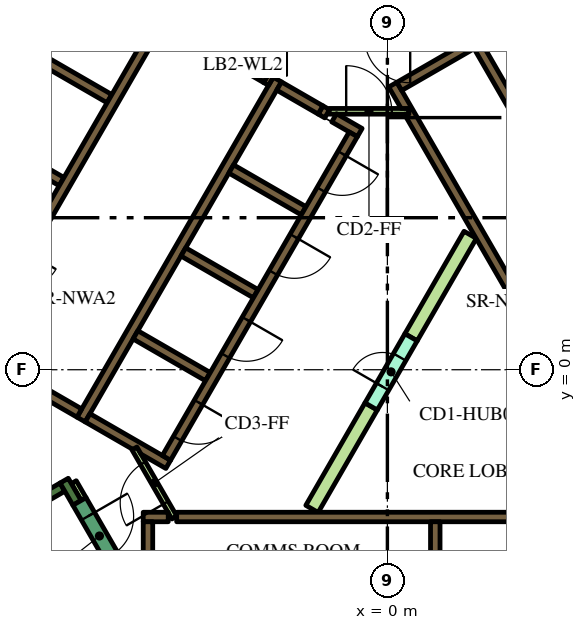
"""IFC4 building model, lengths in metres.
Left out: names, types, materials, properties, quantities, classifications, styles, units other than length and angle.
Written with IfcOpenShell. Run it as: python <this file> out.ifc"""

import sys

from ifc_helpers import new_model, si_unit, direction, frame, frame_2d, origin, place, context, subcontext, project, spatial, polyline, rectangle, outline, extrude, element, fill, save


model = new_model("IFC4")
c1 = context("Model", 3, precision=1e-05, world=origin(), true_north=direction((0.0, 1.0)))
c2 = subcontext(c1, "Body", "Model", "MODEL_VIEW")
j1 = project(units=[si_unit("LENGTHUNIT", "METRE"), si_unit("PLANEANGLEUNIT", "RADIAN")], contexts=[c1])
p1 = place(None, origin())
s1 = spatial("IfcSite", under=j1, at=p1, CompositionType="ELEMENT")
p2 = place(p1, origin())
s2 = spatial("IfcBuilding", under=s1, at=p2, CompositionType="ELEMENT")
p3 = place(p2, frame((0.0, 0.0, 107.1)))
s3 = spatial("IfcBuildingStorey", under=s2, at=p3, CompositionType="ELEMENT", Elevation=107.1)
p4 = place(p3, frame((-15.36, -1.503, 0.0), z_axis=(0.0, 0.0, 1.0), x_axis=(0.50000389221, 0.866023156604, 0.0)))
e1 = element("IfcWall", 1, at=p4, inside=s3, PredefinedType="SOLIDWALL", context=c2, shape_type="SweptSolid", body=[
    extrude(rectangle(XDim=21.0, YDim=0.9, at=frame_2d((10.5, 0.0))), origin(), (0.0, 0.0, 1.0), 3.9),
])
p5 = place(p3, frame((-14.44, -6.49, 0.0), z_axis=(0.0, 0.0, 1.0), x_axis=(0.866022966069, 0.500004222222, 0.0)))
e2 = element("IfcWall", 2, at=p5, inside=s3, PredefinedType="SOLIDWALL", context=c2, shape_type="SweptSolid", body=[
    extrude(rectangle(XDim=6.8, YDim=0.25, at=frame_2d((3.4, 0.0))), origin(), (0.0, 0.0, 1.0), 3.9),
])
p6 = place(p3, frame((-8.168, -3.503, 0.0), z_axis=(0.0, 0.0, 1.0), x_axis=(-0.499952099219, 0.866053057547, 0.0)))
e3 = element("IfcWall", 3, at=p6, inside=s3, PredefinedType="SOLIDWALL", context=c2, shape_type="SweptSolid", body=[
    extrude(rectangle(XDim=0.675, YDim=0.25, at=frame_2d((0.337, 0.0))), origin(), (0.0, 0.0, 1.0), 3.9),
])
p7 = place(p3, frame((-5.545, -3.875, 0.0), z_axis=(0.0, 0.0, 1.0), x_axis=(1.0, 0.0, 0.0)))
e4 = element("IfcWall", 4, at=p7, inside=s3, PredefinedType="SOLIDWALL", context=c2, shape_type="SweptSolid", body=[
    extrude(rectangle(XDim=11.97, YDim=0.25, at=frame_2d((5.985, 0.0))), origin(), (0.0, 0.0, 1.0), 3.9),
])
p8 = place(p3, frame((-6.425, -3.875, 0.0), z_axis=(0.0, 0.0, 1.0), x_axis=(1.0, 0.0, 0.0)))
e5 = element("IfcWall", 5, at=p8, inside=s3, PredefinedType="SOLIDWALL", context=c2, shape_type="SweptSolid", body=[
    extrude(rectangle(XDim=0.658, YDim=0.25, at=frame_2d((0.329, 0.0))), origin(), (0.0, 0.0, 1.0), 3.9),
])
p9 = place(p3, frame((1.26, -4.0, 0.0), z_axis=(0.0, 0.0, 1.0), x_axis=(0.0, -1.0, 0.0)))
e6 = element("IfcWall", 6, at=p9, inside=s3, PredefinedType="SOLIDWALL", context=c2, shape_type="SweptSolid", body=[
    extrude(rectangle(XDim=2.2, YDim=0.25, at=frame_2d((1.1, 0.0))), origin(), (0.0, 0.0, 1.0), 3.9),
])
p10 = place(p3, frame((-6.3, -4.0, 0.0), z_axis=(0.0, 0.0, 1.0), x_axis=(0.0, -1.0, 0.0)))
e7 = element("IfcWall", 7, at=p10, inside=s3, PredefinedType="SOLIDWALL", context=c2, shape_type="SweptSolid", body=[
    extrude(rectangle(XDim=3.154, YDim=0.25, at=frame_2d((1.577, 0.0))), origin(), (0.0, 0.0, 1.0), 3.9),
])
p11 = place(p3, origin())
e8 = element("IfcWall", 8, at=p11, inside=s3, PredefinedType="SOLIDWALL", context=c2, shape_type="SweptSolid", body=[
    extrude(outline(polyline([(0.566, 6.725), (0.566, 6.875), (0.566, 6.875), (0.565, 6.875), (0.361, 6.875), (0.035, 7.439), (0.252, 7.564), (0.377, 7.348), (6.552, -3.348), (6.677, -3.564), (6.46, -3.689), (0.448, 6.725), (0.565, 6.725), (0.566, 6.725), (0.566, 6.725)])), origin(), (0.0, 0.0, 1.0), 3.9),
])
p12 = place(p3, frame((0.314, 7.456, 0.0), z_axis=(0.0, 0.0, 1.0), x_axis=(0.866013897511, 0.50001992892, 0.0)))
e9 = element("IfcWall", 9, at=p12, inside=s3, PredefinedType="SOLIDWALL", context=c2, shape_type="SweptSolid", body=[
    extrude(rectangle(XDim=3.268, YDim=0.25, at=frame_2d((1.634, 0.0))), origin(), (0.0, 0.0, 1.0), 3.9),
])
p13 = place(p3, frame((-8.06, -1.311, 0.0), z_axis=(0.0, 0.0, 1.0), x_axis=(0.50000273126, 0.866023826885, 0.0)))
e10 = element("IfcWall", 10, at=p13, inside=s3, PredefinedType="SOLIDWALL", context=c2, shape_type="SweptSolid", body=[
    extrude(rectangle(XDim=10.33, YDim=0.25, at=frame_2d((5.165, 0.0))), origin(), (0.0, 0.0, 1.0), 3.9),
])
p14 = place(p3, frame((-1.758, 6.835, 0.0), z_axis=(0.0, 0.0, 1.0), x_axis=(0.865982457891, -0.500074377092, 0.0)))
e11 = element("IfcWall", 11, at=p14, inside=s3, PredefinedType="SOLIDWALL", context=c2, shape_type="SweptSolid", body=[
    extrude(rectangle(XDim=0.2, YDim=0.25, at=frame_2d((0.1, 0.0))), origin(), (0.0, 0.0, 1.0), 3.9),
])
p15 = place(p3, frame((-1.76, 6.836, 0.0), z_axis=(0.0, 0.0, 1.0), x_axis=(-0.865952863304, 0.500125622755, 0.0)))
e12 = element("IfcWall", 12, at=p15, inside=s3, PredefinedType="SOLIDWALL", context=c2, shape_type="SweptSolid", body=[
    extrude(rectangle(XDim=1.258, YDim=0.25, at=frame_2d((0.629, 0.0))), origin(), (0.0, 0.0, 1.0), 3.9),
])
p16 = place(p3, frame((-0.728, 6.24, 0.0), z_axis=(0.0, 0.0, 1.0), x_axis=(-0.865955664968, 0.500120771724, 0.0)))
e13 = element("IfcWall", 13, at=p16, inside=s3, PredefinedType="SOLIDWALL", context=c2, shape_type="SweptSolid", body=[
    extrude(rectangle(XDim=0.778, YDim=0.25, at=frame_2d((0.389, 0.0))), origin(), (0.0, 0.0, 1.0), 3.9),
])
for number, where, z_axis, x_axis in (
    (14, (-2.204, 4.182, 0.0), (0.0, 0.0, 1.0), (-0.866, 0.5, 0.0)),
    (15, (-5.369, 3.1, 0.0), (0.0, 0.0, 1.0), (0.866, -0.5, 0.0)),
    (16, (-4.724, -0.182, 0.0), (0.0, 0.0, 1.0), (-0.866, 0.5, 0.0)),
):
    element("IfcWall", number, at=place(p3, frame(where, z_axis=z_axis, x_axis=x_axis)), inside=s3, PredefinedType="SOLIDWALL", context=c2, shape_type="SweptSolid", body=[
        extrude(rectangle(XDim=2.2, YDim=0.25, at=frame_2d((1.1, 0.0))), origin(), (0.0, 0.0, 1.0), 3.9),
    ])
e17 = element("IfcWall", 17, at=p11, inside=s3, PredefinedType="SOLIDWALL", context=c2, shape_type="SweptSolid", body=[
    extrude(outline(polyline([(-5.922, -2.257), (-5.922, -2.257), (-5.705, -2.382), (-5.83, -2.598), (-6.483, -2.221), (-6.591, -2.033), (-6.591, -2.033), (-6.7, -2.096), (-7.952, -1.373), (-7.827, -1.156), (-5.922, -2.257)])), origin(), (0.0, 0.0, 1.0), 3.9),
])
p17 = place(p3, frame((-8.106, -1.14, 0.0), z_axis=(0.0, 0.0, 1.0), x_axis=(-0.866000643155, 0.500042884217, 0.0)))
e18 = element("IfcWall", 18, at=p17, inside=s3, PredefinedType="SOLIDWALL", context=c2, shape_type="SweptSolid", body=[
    extrude(rectangle(XDim=5.65, YDim=0.25, at=frame_2d((2.825, 0.0))), origin(), (0.0, 0.0, 1.0), 3.9),
])
e19 = element("IfcWall", 19, at=p11, inside=s3, PredefinedType="SOLIDWALL", context=c2, shape_type="SweptSolid", body=[
    extrude(outline(polyline([(-3.128, 7.481), (-3.259, 7.557), (-3.134, 7.773), (-3.003, 7.698), (-3.128, 7.481)])), origin(), (0.0, 0.0, 1.0), 3.9),
])
for number, where, z_axis, x_axis in (
    (20, (-8.574, 4.95, 0.0), (0.0, 0.0, 1.0), (-0.866, 0.5, 0.0)),
    (21, (-7.314, 7.132, 0.0), (0.0, 0.0, 1.0), (-0.866, 0.5, 0.0)),
):
    element("IfcWall", number, at=place(p3, frame(where, z_axis=z_axis, x_axis=x_axis)), inside=s3, PredefinedType="SOLIDWALL", context=c2, shape_type="SweptSolid", body=[
        extrude(rectangle(XDim=2.2, YDim=0.25, at=frame_2d((1.1, 0.0))), origin(), (0.0, 0.0, 1.0), 3.9),
    ])
p18 = place(p3, frame((-7.959, 10.415, 0.0), z_axis=(0.0, 0.0, 1.0), x_axis=(0.866020958405, -0.500007699544, 0.0)))
e22 = element("IfcWall", 22, at=p18, inside=s3, PredefinedType="SOLIDWALL", context=c2, shape_type="SweptSolid", body=[
    extrude(rectangle(XDim=4.1, YDim=0.25, at=frame_2d((2.05, 0.0))), origin(), (0.0, 0.0, 1.0), 3.9),
])
p19 = place(p3, frame((-8.252, -2.958, 0.0), z_axis=(0.0, 0.0, 1.0), x_axis=(0.500174715838, -0.865924508047, 0.0)))
e23 = element("IfcWall", 23, at=p19, inside=s3, PredefinedType="PARTITIONING", context=c2, shape_type="SweptSolid", body=[
    extrude(rectangle(XDim=0.514, YDim=0.15, at=frame_2d((0.257, 0.0))), origin(), (0.0, 0.0, 1.0), 2.75),
])
e24 = element("IfcWall", 24, at=p11, inside=s3, PredefinedType="PARTITIONING", context=c2, shape_type="SweptSolid", body=[
    extrude(outline(polyline([(-0.59, -0.872), (-0.265, -1.059), (-1.822, -3.756), (-2.147, -3.568), (-0.59, -0.872)])), origin(), (0.0, 0.0, 1.0), 2.75),
])
e25 = element("IfcWall", 25, at=p11, inside=s3, PredefinedType="PARTITIONING", context=c2, shape_type="SweptSolid", body=[
    extrude(outline(polyline([(2.017, 3.643), (2.342, 3.456), (0.785, 0.76), (0.46, 0.947), (2.017, 3.643)])), origin(), (0.0, 0.0, 1.0), 2.75),
])
p20 = place(p3, frame((8.565, -2.185, 0.0), z_axis=(0.0, 0.0, 1.0), x_axis=(-0.499997954832, 0.866026584559, 0.0)))
e26 = element("IfcWall", 26, at=p20, inside=s3, PredefinedType="SOLIDWALL", context=c2, shape_type="SweptSolid", body=[
    extrude(rectangle(XDim=12.35, YDim=0.25, at=frame_2d((6.175, 0.0))), origin(), (0.0, 0.0, 1.0), 3.9),
])
p21 = place(p20, frame((5.725, 0.0, 0.0)))
e27 = element("IfcOpeningElement", 27, at=p21, cuts=e26, PredefinedType="OPENING", context=c2, shape_type="SweptSolid", body=[
    extrude(rectangle(XDim=0.9, YDim=2.1, at=frame_2d((0.45, 1.05))), frame((0.0, 0.135, 0.0), z_axis=(0.0, -1.0, 0.0), x_axis=(1.0, 0.0, 0.0)), (0.0, 0.0, 1.0), 0.27),
])
p22 = place(p3, frame((-6.008, 9.144, 0.0), z_axis=(0.0, 0.0, 1.0), x_axis=(-0.500006956611, -0.866021387346, 0.0)))
e28 = element("IfcWall", 28, at=p22, inside=s3, PredefinedType="SOLIDWALL", context=c2, shape_type="SweptSolid", body=[
    extrude(rectangle(XDim=9.83, YDim=0.25, at=frame_2d((4.915, 0.0))), origin(), (0.0, 0.0, 1.0), 3.9),
])
p23 = place(p22, frame((6.985, 0.0, 0.0)))
e29 = element("IfcOpeningElement", 29, at=p23, cuts=e28, PredefinedType="OPENING", context=c2, shape_type="SweptSolid", body=[
    extrude(rectangle(XDim=0.9, YDim=2.1, at=frame_2d((0.45, 1.05))), frame((0.0, 0.135, 0.0), z_axis=(0.0, -1.0, 0.0), x_axis=(1.0, 0.0, 0.0)), (0.0, 0.0, 1.0), 0.27),
])
p24 = place(p3, frame((-0.898, 6.194, 0.0), z_axis=(0.0, 0.0, 1.0), x_axis=(-0.499996202215, -0.866027596426, 0.0)))
e30 = element("IfcWall", 30, at=p24, inside=s3, PredefinedType="SOLIDWALL", context=c2, shape_type="SweptSolid", body=[
    extrude(rectangle(XDim=9.83, YDim=0.25, at=frame_2d((4.915, 0.0))), origin(), (0.0, 0.0, 1.0), 3.9),
])
p25 = place(p24, frame((0.585, 0.0, 0.0)))
e31 = element("IfcOpeningElement", 31, at=p25, cuts=e30, PredefinedType="OPENING", context=c2, shape_type="SweptSolid", body=[
    extrude(rectangle(XDim=1.1, YDim=2.1, at=frame_2d((0.55, 1.05))), frame((0.0, 0.135, 0.0), z_axis=(0.0, -1.0, 0.0), x_axis=(1.0, 0.0, 0.0)), (0.0, 0.0, 1.0), 0.27),
])
p26 = place(p24, frame((3.105, 0.0, 0.0)))
e32 = element("IfcOpeningElement", 32, at=p26, cuts=e30, PredefinedType="OPENING", context=c2, shape_type="SweptSolid", body=[
    extrude(rectangle(XDim=1.1, YDim=2.1, at=frame_2d((0.55, 1.05))), frame((0.0, 0.135, 0.0), z_axis=(0.0, -1.0, 0.0), x_axis=(1.0, 0.0, 0.0)), (0.0, 0.0, 1.0), 0.27),
])
p27 = place(p24, frame((5.625, 0.0, 0.0)))
e33 = element("IfcOpeningElement", 33, at=p27, cuts=e30, PredefinedType="OPENING", context=c2, shape_type="SweptSolid", body=[
    extrude(rectangle(XDim=1.1, YDim=2.1, at=frame_2d((0.55, 1.05))), frame((0.0, 0.135, 0.0), z_axis=(0.0, -1.0, 0.0), x_axis=(1.0, 0.0, 0.0)), (0.0, 0.0, 1.0), 0.27),
])
p28 = place(p24, frame((8.145, 0.0, 0.0)))
e34 = element("IfcOpeningElement", 34, at=p28, cuts=e30, PredefinedType="OPENING", context=c2, shape_type="SweptSolid", body=[
    extrude(rectangle(XDim=1.1, YDim=2.1, at=frame_2d((0.55, 1.05))), frame((0.0, 0.135, 0.0), z_axis=(0.0, -1.0, 0.0), x_axis=(1.0, 0.0, 0.0)), (0.0, 0.0, 1.0), 0.27),
])
p29 = place(p3, frame((-8.103, -3.466, 0.0), z_axis=(0.0, 0.0, 1.0), x_axis=(0.500078061341, -0.865980330357, 0.0)))
e35 = element("IfcWall", 35, at=p29, inside=s3, PredefinedType="SOLIDWALL", context=c2, shape_type="SweptSolid", body=[
    extrude(rectangle(XDim=2.1, YDim=0.4, at=frame_2d((1.05, 0.0))), origin(), (0.0, 0.0, 1.0), 3.9),
])
p30 = place(p29, frame((0.45, 0.0, 0.0)))
e36 = element("IfcOpeningElement", 36, at=p30, cuts=e35, PredefinedType="OPENING", context=c2, shape_type="SweptSolid", body=[
    extrude(rectangle(XDim=1.2, YDim=2.1, at=frame_2d((0.6, 1.05))), frame((0.0, 0.21, 0.0), z_axis=(0.0, -1.0, 0.0), x_axis=(1.0, 0.0, 0.0)), (0.0, 0.0, 1.0), 0.42),
])
p31 = place(p3, frame((-0.427, -0.966, 0.0), z_axis=(0.0, 0.0, 1.0), x_axis=(0.49994051562, 0.866059744384, 0.0)))
e37 = element("IfcWall", 37, at=p31, inside=s3, PredefinedType="PARTITIONING", context=c2, shape_type="SweptSolid", body=[
    extrude(rectangle(XDim=2.1, YDim=0.375, at=frame_2d((1.05, 0.0))), origin(), (0.0, 0.0, 1.0), 2.75),
])
p32 = place(p31, frame((0.6, 0.0, 0.0)))
e38 = element("IfcOpeningElement", 38, at=p32, cuts=e37, PredefinedType="OPENING", context=c2, shape_type="SweptSolid", body=[
    extrude(rectangle(XDim=0.9, YDim=2.1, at=frame_2d((0.45, 1.05))), frame((0.0, 0.198, 0.0), z_axis=(0.0, -1.0, 0.0), x_axis=(1.0, 0.0, 0.0)), (0.0, 0.0, 1.0), 0.395),
])
p33 = place(p3, frame((-1.534, 6.8, 0.0), z_axis=(0.0, 0.0, 1.0), x_axis=(1.0, 0.0, 0.0)))
e39 = element("IfcWall", 39, at=p33, inside=s3, PredefinedType="PARTITIONING", context=c2, shape_type="SweptSolid", body=[
    extrude(rectangle(XDim=2.1, YDim=0.15, at=frame_2d((1.05, 0.0))), origin(), (0.0, 0.0, 1.0), 2.75),
])
p34 = place(p33, frame((0.45, 0.0, 0.0)))
e40 = element("IfcOpeningElement", 40, at=p34, cuts=e39, PredefinedType="OPENING", context=c2, shape_type="SweptSolid", body=[
    extrude(rectangle(XDim=1.2, YDim=2.1, at=frame_2d((0.6, 1.05))), frame((0.0, 0.085, 0.0), z_axis=(0.0, -1.0, 0.0), x_axis=(1.0, 0.0, 0.0)), (0.0, 0.0, 1.0), 0.17),
])
p35 = place(p3, frame((-5.606, -3.89, 0.0), z_axis=(0.0, 0.0, 1.0), x_axis=(-0.500027713859, 0.866009402589, 0.0)))
e41 = element("IfcWall", 41, at=p35, inside=s3, PredefinedType="PARTITIONING", context=c2, shape_type="SweptSolid", body=[
    extrude(rectangle(XDim=2.1, YDim=0.15, at=frame_2d((1.05, 0.0))), origin(), (0.0, 0.0, 1.0), 2.75),
])
p36 = place(p35, frame((0.45, 0.0, 0.0)))
e42 = element("IfcOpeningElement", 42, at=p36, cuts=e41, PredefinedType="OPENING", context=c2, shape_type="SweptSolid", body=[
    extrude(rectangle(XDim=1.2, YDim=2.1, at=frame_2d((0.6, 1.05))), frame((0.0, 0.085, 0.0), z_axis=(0.0, -1.0, 0.0), x_axis=(1.0, 0.0, 0.0)), (0.0, 0.0, 1.0), 0.17),
])
p37 = place(p3, frame((-4.409, 8.365, 0.0), z_axis=(0.0, 0.0, 1.0), x_axis=(0.866034573852, -0.49998411664, 0.0)))
e43 = element("IfcWall", 43, at=p37, inside=s3, PredefinedType="SOLIDWALL", context=c2, shape_type="SweptSolid", body=[
    extrude(rectangle(XDim=1.4, YDim=0.25, at=frame_2d((0.7, 0.0))), origin(), (0.0, 0.0, 1.0), 3.9),
])
p38 = place(p37, frame((0.1, 0.0, 0.0)))
e44 = element("IfcOpeningElement", 44, at=p38, cuts=e43, PredefinedType="OPENING", context=c2, shape_type="SweptSolid", body=[
    extrude(rectangle(XDim=1.2, YDim=2.1, at=frame_2d((0.6, 1.05))), frame((0.0, 0.135, 0.0), z_axis=(0.0, -1.0, 0.0), x_axis=(1.0, 0.0, 0.0)), (0.0, 0.0, 1.0), 0.27),
])
p39 = place(p3, frame((-19.081, -3.9, 0.0), z_axis=(0.0, 0.0, 1.0), x_axis=(0.499998313975, 0.866026377209, 0.0)))
e45 = element("IfcWall", 45, at=p39, inside=s3, PredefinedType="PARTITIONING", context=c2, shape_type="SweptSolid", body=[
    extrude(rectangle(XDim=25.766, YDim=0.15, at=frame_2d((12.883, 0.0))), origin(), (0.0, 0.0, 1.0), 2.75),
])
p40 = place(p39, frame((19.306, 0.0, 0.0)))
e46 = element("IfcOpeningElement", 46, at=p40, cuts=e45, PredefinedType="OPENING", context=c2, shape_type="SweptSolid", body=[
    extrude(rectangle(XDim=1.0, YDim=2.1, at=frame_2d((0.5, 1.05))), frame((0.0, 0.085, 0.0), z_axis=(0.0, -1.0, 0.0), x_axis=(1.0, 0.0, 0.0)), (0.0, 0.0, 1.0), 0.17),
])
p41 = place(p39, frame((18.0, 0.0, 0.0)))
e47 = element("IfcOpeningElement", 47, at=p41, cuts=e45, PredefinedType="OPENING", context=c2, shape_type="SweptSolid", body=[
    extrude(rectangle(XDim=1.0, YDim=2.1, at=frame_2d((0.5, 1.05))), frame((0.0, 0.085, 0.0), z_axis=(0.0, -1.0, 0.0), x_axis=(1.0, 0.0, 0.0)), (0.0, 0.0, 1.0), 0.17),
])
p42 = place(p39, frame((6.838, 0.0, 0.0)))
e48 = element("IfcOpeningElement", 48, at=p42, cuts=e45, PredefinedType="OPENING", context=c2, shape_type="SweptSolid", body=[
    extrude(rectangle(XDim=1.0, YDim=2.1, at=frame_2d((0.5, 1.05))), frame((0.0, 0.085, 0.0), z_axis=(0.0, -1.0, 0.0), x_axis=(1.0, 0.0, 0.0)), (0.0, 0.0, 1.0), 0.17),
])
p43 = place(p39, frame((4.674, 0.0, 0.0)))
e49 = element("IfcOpeningElement", 49, at=p43, cuts=e45, PredefinedType="OPENING", context=c2, shape_type="SweptSolid", body=[
    extrude(rectangle(XDim=0.9, YDim=2.1, at=frame_2d((0.45, 1.05))), frame((0.0, 0.085, 0.0), z_axis=(0.0, -1.0, 0.0), x_axis=(1.0, 0.0, 0.0)), (0.0, 0.0, 1.0), 0.17),
])
p44 = place(p39, frame((0.18, 0.0, 0.0)))
e50 = element("IfcOpeningElement", 50, at=p44, cuts=e45, PredefinedType="OPENING", context=c2, shape_type="SweptSolid", body=[
    extrude(rectangle(XDim=1.0, YDim=2.1, at=frame_2d((0.5, 1.05))), frame((0.0, 0.085, 0.0), z_axis=(0.0, -1.0, 0.0), x_axis=(1.0, 0.0, 0.0)), (0.0, 0.0, 1.0), 0.17),
])
p45 = place(p25, origin())
e51 = element("IfcDoor", 51, at=p45, inside=s3, OperationType="DOUBLE_DOOR_SLIDING", PredefinedType="DOOR", context=c2, shape_type="SweptSolid", body=[
    extrude(rectangle(XDim=1.1, YDim=2.1, at=frame_2d((0.55, 1.05))), frame((0.0, 0.025, 0.0), z_axis=(0.0, -1.0, 0.0), x_axis=(1.0, 0.0, 0.0)), (0.0, 0.0, 1.0), 0.05),
])
fill(e31, e51)
p46 = place(p26, origin())
e52 = element("IfcDoor", 52, at=p46, inside=s3, OperationType="DOUBLE_DOOR_SLIDING", PredefinedType="DOOR", context=c2, shape_type="SweptSolid", body=[
    extrude(rectangle(XDim=1.1, YDim=2.1, at=frame_2d((0.55, 1.05))), frame((0.0, 0.025, 0.0), z_axis=(0.0, -1.0, 0.0), x_axis=(1.0, 0.0, 0.0)), (0.0, 0.0, 1.0), 0.05),
])
fill(e32, e52)
p47 = place(p27, origin())
e53 = element("IfcDoor", 53, at=p47, inside=s3, OperationType="DOUBLE_DOOR_SLIDING", PredefinedType="DOOR", context=c2, shape_type="SweptSolid", body=[
    extrude(rectangle(XDim=1.1, YDim=2.1, at=frame_2d((0.55, 1.05))), frame((0.0, 0.025, 0.0), z_axis=(0.0, -1.0, 0.0), x_axis=(1.0, 0.0, 0.0)), (0.0, 0.0, 1.0), 0.05),
])
fill(e33, e53)
p48 = place(p28, origin())
e54 = element("IfcDoor", 54, at=p48, inside=s3, OperationType="DOUBLE_DOOR_SLIDING", PredefinedType="DOOR", context=c2, shape_type="SweptSolid", body=[
    extrude(rectangle(XDim=1.1, YDim=2.1, at=frame_2d((0.55, 1.05))), frame((0.0, 0.025, 0.0), z_axis=(0.0, -1.0, 0.0), x_axis=(1.0, 0.0, 0.0)), (0.0, 0.0, 1.0), 0.05),
])
fill(e34, e54)
p49 = place(p30, origin())
e55 = element("IfcDoor", 55, at=p49, inside=s3, OperationType="SINGLE_SWING_LEFT", PredefinedType="DOOR", context=c2, shape_type="SweptSolid", body=[
    extrude(rectangle(XDim=1.2, YDim=2.1, at=frame_2d((0.6, 1.05))), frame((0.0, 0.025, 0.0), z_axis=(0.0, -1.0, 0.0), x_axis=(1.0, 0.0, 0.0)), (0.0, 0.0, 1.0), 0.05),
])
fill(e36, e55)
p50 = place(p32, origin())
e56 = element("IfcDoor", 56, at=p50, inside=s3, OperationType="SINGLE_SWING_LEFT", PredefinedType="DOOR", context=c2, shape_type="SweptSolid", body=[
    extrude(rectangle(XDim=0.9, YDim=2.1, at=frame_2d((0.45, 1.05))), frame((0.0, 0.025, 0.0), z_axis=(0.0, -1.0, 0.0), x_axis=(1.0, 0.0, 0.0)), (0.0, 0.0, 1.0), 0.05),
])
fill(e38, e56)
p51 = place(p34, origin())
e57 = element("IfcDoor", 57, at=p51, inside=s3, OperationType="SINGLE_SWING_LEFT", PredefinedType="DOOR", context=c2, shape_type="SweptSolid", body=[
    extrude(rectangle(XDim=1.2, YDim=2.1, at=frame_2d((0.6, 1.05))), frame((0.0, 0.025, 0.0), z_axis=(0.0, -1.0, 0.0), x_axis=(1.0, 0.0, 0.0)), (0.0, 0.0, 1.0), 0.05),
])
fill(e40, e57)
p52 = place(p36, origin())
e58 = element("IfcDoor", 58, at=p52, inside=s3, OperationType="SINGLE_SWING_LEFT", PredefinedType="DOOR", context=c2, shape_type="SweptSolid", body=[
    extrude(rectangle(XDim=1.2, YDim=2.1, at=frame_2d((0.6, 1.05))), frame((0.0, 0.025, 0.0), z_axis=(0.0, -1.0, 0.0), x_axis=(1.0, 0.0, 0.0)), (0.0, 0.0, 1.0), 0.05),
])
fill(e42, e58)
p53 = place(p38, origin())
e59 = element("IfcDoor", 59, at=p53, inside=s3, OperationType="SINGLE_SWING_LEFT", PredefinedType="DOOR", context=c2, shape_type="SweptSolid", body=[
    extrude(rectangle(XDim=1.2, YDim=2.1, at=frame_2d((0.6, 1.05))), frame((0.0, 0.025, 0.0), z_axis=(0.0, -1.0, 0.0), x_axis=(1.0, 0.0, 0.0)), (0.0, 0.0, 1.0), 0.05),
])
fill(e44, e59)
save(model, sys.argv[1])
